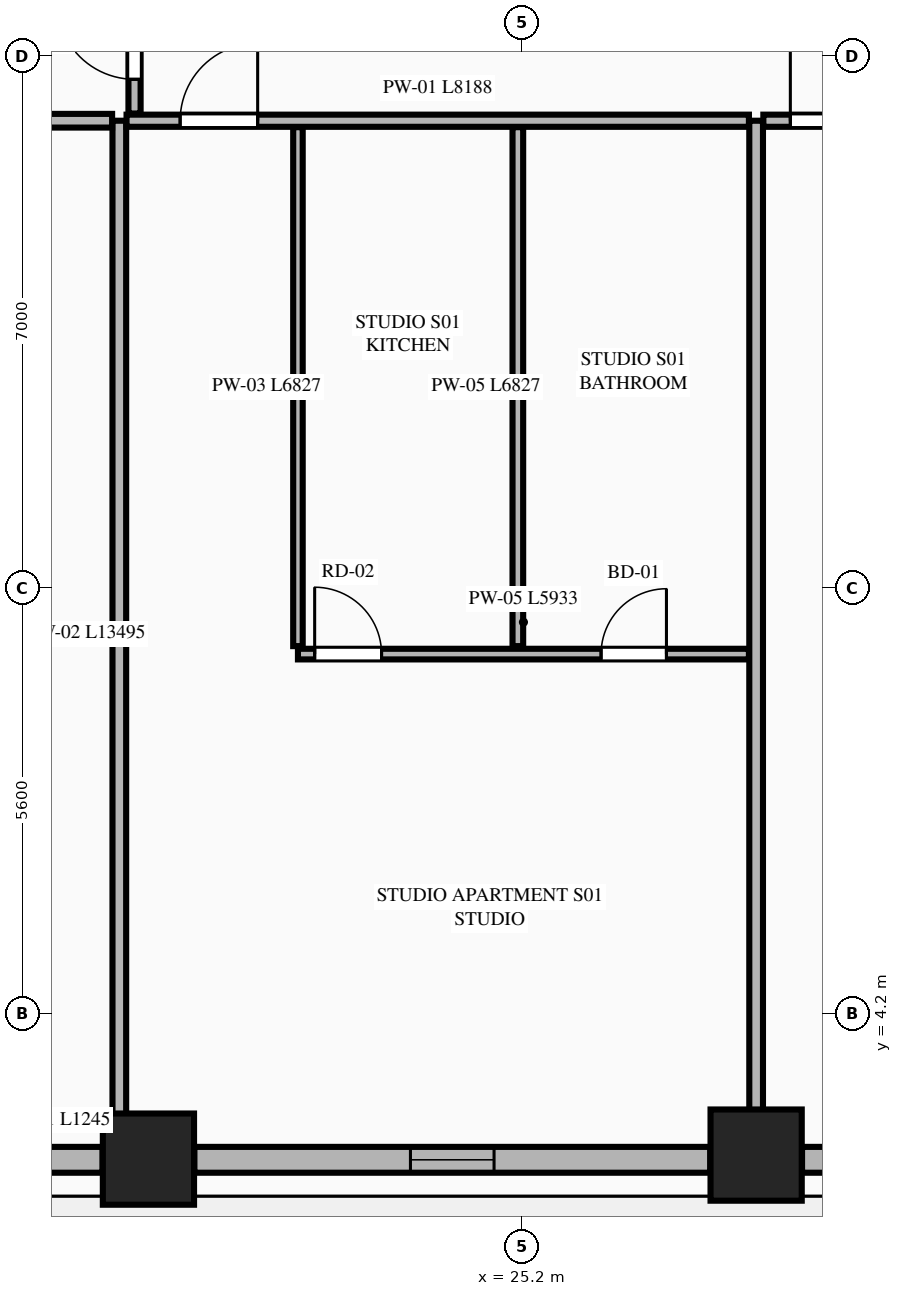
"""IFC4 building model, lengths in metres.
Left out: names, types, materials, properties, quantities, classifications, styles, units other than length and angle.
Written with IfcOpenShell. Run it as: python <this file> out.ifc"""

import sys

from ifc_helpers import new_model, si_unit, direction, frame, frame_2d, origin, origin_2d, place, context, subcontext, project, spatial, rectangle, extrude, element, fill, save


model = new_model("IFC4")
c1 = context("Model", 3, precision=1e-05, world=origin(), true_north=direction((0.0, 1.0)))
c2 = subcontext(c1, "Body", "Model", "MODEL_VIEW")
j1 = project(units=[si_unit("LENGTHUNIT", "METRE"), si_unit("PLANEANGLEUNIT", "RADIAN")], contexts=[c1])
p1 = place(None, origin())
s1 = spatial("IfcSite", under=j1, at=p1, CompositionType="ELEMENT")
p2 = place(p1, origin())
s2 = spatial("IfcBuilding", under=s1, at=p2, CompositionType="ELEMENT")
p3 = place(p2, frame((0.0, 0.0, 28.45)))
s3 = spatial("IfcBuildingStorey", under=s2, at=p3, CompositionType="ELEMENT", Elevation=28.45)
for number, where, z_axis, x_axis in (
    (1, (20.283, 2.289, 0.0), (0.0, 0.0, 1.0), (1.0, 0.0, 0.0)),
    (2, (28.278, 2.342, 0.0), (0.0, 0.0, 1.0), (1.0, 0.0, 0.0)),
):
    element("IfcColumn", number, at=place(p3, frame(where, z_axis=z_axis, x_axis=x_axis)), inside=s3, PredefinedType="COLUMN", context=c2, shape_type="SweptSolid", body=[
        extrude(rectangle(XDim=1.2, YDim=1.2, at=origin_2d()), origin(), (0.0, 0.0, 1.0), 3.55),
    ])
p4 = place(p3, frame((18.434, 2.28, 0.0), z_axis=(0.0, 0.0, 1.0), x_axis=(1.0, 0.0, 0.0)))
e3 = element("IfcWall", 3, at=p4, inside=s3, PredefinedType="STANDARD", context=c2, shape_type="SweptSolid", body=[
    extrude(rectangle(XDim=1.245, YDim=0.34, at=frame_2d((0.623, 0.0))), origin(), (0.0, 0.0, 1.0), 3.33),
])
p5 = place(p3, frame((20.887, 2.28, 0.0), z_axis=(0.0, 0.0, 1.0), x_axis=(1.0, 0.0, 0.0)))
e4 = element("IfcWall", 4, at=p5, inside=s3, PredefinedType="STANDARD", context=c2, shape_type="SweptSolid", body=[
    extrude(rectangle(XDim=6.787, YDim=0.34, at=frame_2d((3.394, 0.0))), origin(), (0.0, 0.0, 1.0), 2.787),
])
p6 = place(p5, frame((2.843, 0.0, 0.75)))
e5 = element("IfcOpeningElement", 5, at=p6, cuts=e4, PredefinedType="OPENING", context=c2, shape_type="SweptSolid", body=[
    extrude(rectangle(XDim=1.1, YDim=1.887, at=frame_2d((0.55, 0.943))), frame((0.0, 0.18, 0.0), z_axis=(0.0, -1.0, 0.0), x_axis=(1.0, 0.0, 0.0)), (0.0, 0.0, 1.0), 0.36),
])
p7 = place(p3, frame((28.882, 2.28, 0.0), z_axis=(0.0, 0.0, 1.0), x_axis=(1.0, 0.0, 0.0)))
e6 = element("IfcWall", 6, at=p7, inside=s3, PredefinedType="STANDARD", context=c2, shape_type="SweptSolid", body=[
    extrude(rectangle(XDim=7.036, YDim=0.34, at=frame_2d((3.518, 0.0))), origin(), (0.0, 0.0, 1.0), 2.787),
])
p8 = place(p7, frame((2.397, 0.0, 0.0)))
e7 = element("IfcOpeningElement", 7, at=p8, cuts=e6, PredefinedType="OPENING", context=c2, shape_type="SweptSolid", body=[
    extrude(rectangle(XDim=1.1, YDim=2.25, at=frame_2d((0.55, 1.125))), frame((0.0, 0.18, 0.0), z_axis=(0.0, -1.0, 0.0), x_axis=(1.0, 0.0, 0.0)), (0.0, 0.0, 1.0), 0.36),
])
p9 = place(p3, frame((19.9, 2.455, 0.0), z_axis=(0.0, 0.0, 1.0), x_axis=(0.0, 1.0, 0.0)))
e8 = element("IfcWall", 8, at=p9, inside=s3, PredefinedType="PARTITIONING", context=c2, shape_type="SweptSolid", body=[
    extrude(rectangle(XDim=13.495, YDim=0.18, at=frame_2d((6.748, 0.0))), origin(), (0.0, 0.0, 1.0), 3.33),
])
p10 = place(p3, frame((28.278, 2.455, 0.0), z_axis=(0.0, 0.0, 1.0), x_axis=(0.0, 1.0, 0.0)))
e9 = element("IfcWall", 9, at=p10, inside=s3, PredefinedType="PARTITIONING", context=c2, shape_type="SweptSolid", body=[
    extrude(rectangle(XDim=13.495, YDim=0.18, at=frame_2d((6.748, 0.0))), origin(), (0.0, 0.0, 1.0), 2.7),
])
p11 = place(p3, frame((19.995, 15.95, 0.0), z_axis=(0.0, 0.0, 1.0), x_axis=(1.0, 0.0, 0.0)))
e10 = element("IfcWall", 10, at=p11, inside=s3, PredefinedType="PARTITIONING", context=c2, shape_type="SweptSolid", body=[
    extrude(rectangle(XDim=8.188, YDim=0.16, at=frame_2d((4.094, 0.0))), origin(), (0.0, 0.0, 1.0), 3.33),
])
p12 = place(p11, frame((0.705, 0.0, 0.0)))
e11 = element("IfcOpeningElement", 11, at=p12, cuts=e10, PredefinedType="OPENING", context=c2, shape_type="SweptSolid", body=[
    extrude(rectangle(XDim=1.02, YDim=2.25, at=frame_2d((0.51, 1.125))), frame((0.0, 0.09, 0.0), z_axis=(0.0, -1.0, 0.0), x_axis=(1.0, 0.0, 0.0)), (0.0, 0.0, 1.0), 0.18),
])
p13 = place(p3, frame((22.25, 9.038, 0.0), z_axis=(0.0, 0.0, 1.0), x_axis=(0.0, 1.0, 0.0)))
e12 = element("IfcWall", 12, at=p13, inside=s3, PredefinedType="PARTITIONING", context=c2, shape_type="SweptSolid", body=[
    extrude(rectangle(XDim=6.827, YDim=0.125, at=frame_2d((3.414, 0.0))), origin(), (0.0, 0.0, 1.0), 2.7),
])
p14 = place(p3, frame((22.25, 8.933, 0.0), z_axis=(0.0, 0.0, 1.0), x_axis=(1.0, 0.0, 0.0)))
e13 = element("IfcWall", 13, at=p14, inside=s3, PredefinedType="PLUMBINGWALL", context=c2, shape_type="SweptSolid", body=[
    extrude(rectangle(XDim=5.933, YDim=0.14, at=frame_2d((2.967, 0.0))), origin(), (0.0, 0.0, 1.0), 3.33),
])
p15 = place(p14, frame((3.988, 0.0, 0.0)))
e14 = element("IfcOpeningElement", 14, at=p15, cuts=e13, PredefinedType="OPENING", context=c2, shape_type="SweptSolid", body=[
    extrude(rectangle(XDim=0.86, YDim=2.1, at=frame_2d((0.43, 1.05))), frame((0.0, 0.08, 0.0), z_axis=(0.0, -1.0, 0.0), x_axis=(1.0, 0.0, 0.0)), (0.0, 0.0, 1.0), 0.16),
])
p16 = place(p14, frame((0.22, 0.0, 0.0)))
e15 = element("IfcOpeningElement", 15, at=p16, cuts=e13, PredefinedType="OPENING", context=c2, shape_type="SweptSolid", body=[
    extrude(rectangle(XDim=0.88, YDim=2.15, at=frame_2d((0.44, 1.075))), frame((0.0, 0.08, 0.0), z_axis=(0.0, -1.0, 0.0), x_axis=(1.0, 0.0, 0.0)), (0.0, 0.0, 1.0), 0.16),
])
p17 = place(p3, frame((25.143, 9.038, 0.0), z_axis=(0.0, 0.0, 1.0), x_axis=(0.0, 1.0, 0.0)))
e16 = element("IfcWall", 16, at=p17, inside=s3, PredefinedType="PLUMBINGWALL", context=c2, shape_type="SweptSolid", body=[
    extrude(rectangle(XDim=6.827, YDim=0.14, at=frame_2d((3.414, 0.0))), origin(), (0.0, 0.0, 1.0), 3.33),
])
p18 = place(p3, frame((28.373, 15.95, 0.0), z_axis=(0.0, 0.0, 1.0), x_axis=(1.0, 0.0, 0.0)))
e17 = element("IfcWall", 17, at=p18, inside=s3, PredefinedType="PARTITIONING", context=c2, shape_type="SweptSolid", body=[
    extrude(rectangle(XDim=16.432, YDim=0.16, at=frame_2d((8.216, 0.0))), origin(), (0.0, 0.0, 1.0), 3.33),
])
p19 = place(p18, frame((0.355, 0.0, 0.0)))
e18 = element("IfcOpeningElement", 18, at=p19, cuts=e17, PredefinedType="OPENING", context=c2, shape_type="SweptSolid", body=[
    extrude(rectangle(XDim=1.35, YDim=2.35, at=frame_2d((0.675, 1.175))), frame((0.0, 0.09, 0.0), z_axis=(0.0, -1.0, 0.0), x_axis=(1.0, 0.0, 0.0)), (0.0, 0.0, 1.0), 0.18),
])
p20 = place(p3, frame((10.564, 15.95, 0.0), z_axis=(0.0, 0.0, 1.0), x_axis=(1.0, 0.0, 0.0)))
e19 = element("IfcWall", 19, at=p20, inside=s3, PredefinedType="PARTITIONING", context=c2, shape_type="SweptSolid", body=[
    extrude(rectangle(XDim=9.241, YDim=0.18, at=frame_2d((4.621, 0.0))), origin(), (0.0, 0.0, 1.0), 3.33),
])
p21 = place(p3, frame((20.1, 16.045, 0.0), z_axis=(0.0, 0.0, 1.0), x_axis=(0.0, 1.0, 0.0)))
e20 = element("IfcWall", 20, at=p21, inside=s3, PredefinedType="PARTITIONING", context=c2, shape_type="SweptSolid", body=[
    extrude(rectangle(XDim=9.76, YDim=0.16, at=frame_2d((4.88, 0.0))), origin(), (0.0, 0.0, 1.0), 2.7),
])
p22 = place(p21, frame((0.45, 0.0, 0.0)))
e21 = element("IfcOpeningElement", 21, at=p22, cuts=e20, PredefinedType="OPENING", context=c2, shape_type="SweptSolid", body=[
    extrude(rectangle(XDim=1.02, YDim=2.25, at=frame_2d((0.51, 1.125))), frame((0.0, 0.09, 0.0), z_axis=(0.0, -1.0, 0.0), x_axis=(1.0, 0.0, 0.0)), (0.0, 0.0, 1.0), 0.18),
])
p23 = place(p6, origin())
e22 = element("IfcWindow", 22, at=p23, inside=s3, PartitioningType="SINGLE_PANEL", PredefinedType="WINDOW", context=c2, shape_type="SweptSolid", body=[
    extrude(rectangle(XDim=1.1, YDim=1.887, at=frame_2d((0.55, 0.943))), frame((0.0, 0.03, 0.0), z_axis=(0.0, -1.0, 0.0), x_axis=(1.0, 0.0, 0.0)), (0.0, 0.0, 1.0), 0.06),
])
fill(e5, e22)
p24 = place(p15, origin())
e23 = element("IfcDoor", 23, at=p24, inside=s3, OperationType="SINGLE_SWING_RIGHT", PredefinedType="DOOR", context=c2, shape_type="SweptSolid", body=[
    extrude(rectangle(XDim=0.86, YDim=2.1, at=frame_2d((0.43, 1.05))), frame((0.0, 0.025, 0.0), z_axis=(0.0, -1.0, 0.0), x_axis=(1.0, 0.0, 0.0)), (0.0, 0.0, 1.0), 0.05),
])
fill(e14, e23)
p25 = place(p12, origin())
e24 = element("IfcDoor", 24, at=p25, inside=s3, OperationType="SINGLE_SWING_RIGHT", PredefinedType="DOOR", context=c2, shape_type="SweptSolid", body=[
    extrude(rectangle(XDim=1.02, YDim=2.25, at=frame_2d((0.51, 1.125))), frame((0.0, 0.025, 0.0), z_axis=(0.0, -1.0, 0.0), x_axis=(1.0, 0.0, 0.0)), (0.0, 0.0, 1.0), 0.05),
])
fill(e11, e24)
p26 = place(p16, origin())
e25 = element("IfcDoor", 25, at=p26, inside=s3, OperationType="SINGLE_SWING_LEFT", PredefinedType="DOOR", context=c2, shape_type="SweptSolid", body=[
    extrude(rectangle(XDim=0.88, YDim=2.15, at=frame_2d((0.44, 1.075))), frame((0.0, 0.025, 0.0), z_axis=(0.0, -1.0, 0.0), x_axis=(1.0, 0.0, 0.0)), (0.0, 0.0, 1.0), 0.05),
])
fill(e15, e25)
p27 = place(p19, origin())
e26 = element("IfcDoor", 26, at=p27, inside=s3, OperationType="SINGLE_SWING_LEFT", PredefinedType="DOOR", context=c2, shape_type="SweptSolid", body=[
    extrude(rectangle(XDim=1.35, YDim=2.35, at=frame_2d((0.675, 1.175))), frame((0.0, 0.025, 0.0), z_axis=(0.0, -1.0, 0.0), x_axis=(1.0, 0.0, 0.0)), (0.0, 0.0, 1.0), 0.05),
])
fill(e18, e26)
p28 = place(p22, origin())
e27 = element("IfcDoor", 27, at=p28, inside=s3, OperationType="SINGLE_SWING_RIGHT", PredefinedType="DOOR", context=c2, shape_type="SweptSolid", body=[
    extrude(rectangle(XDim=1.02, YDim=2.25, at=frame_2d((0.51, 1.125))), frame((0.0, 0.025, 0.0), z_axis=(0.0, -1.0, 0.0), x_axis=(1.0, 0.0, 0.0)), (0.0, 0.0, 1.0), 0.05),
])
fill(e21, e27)
save(model, sys.argv[1])
